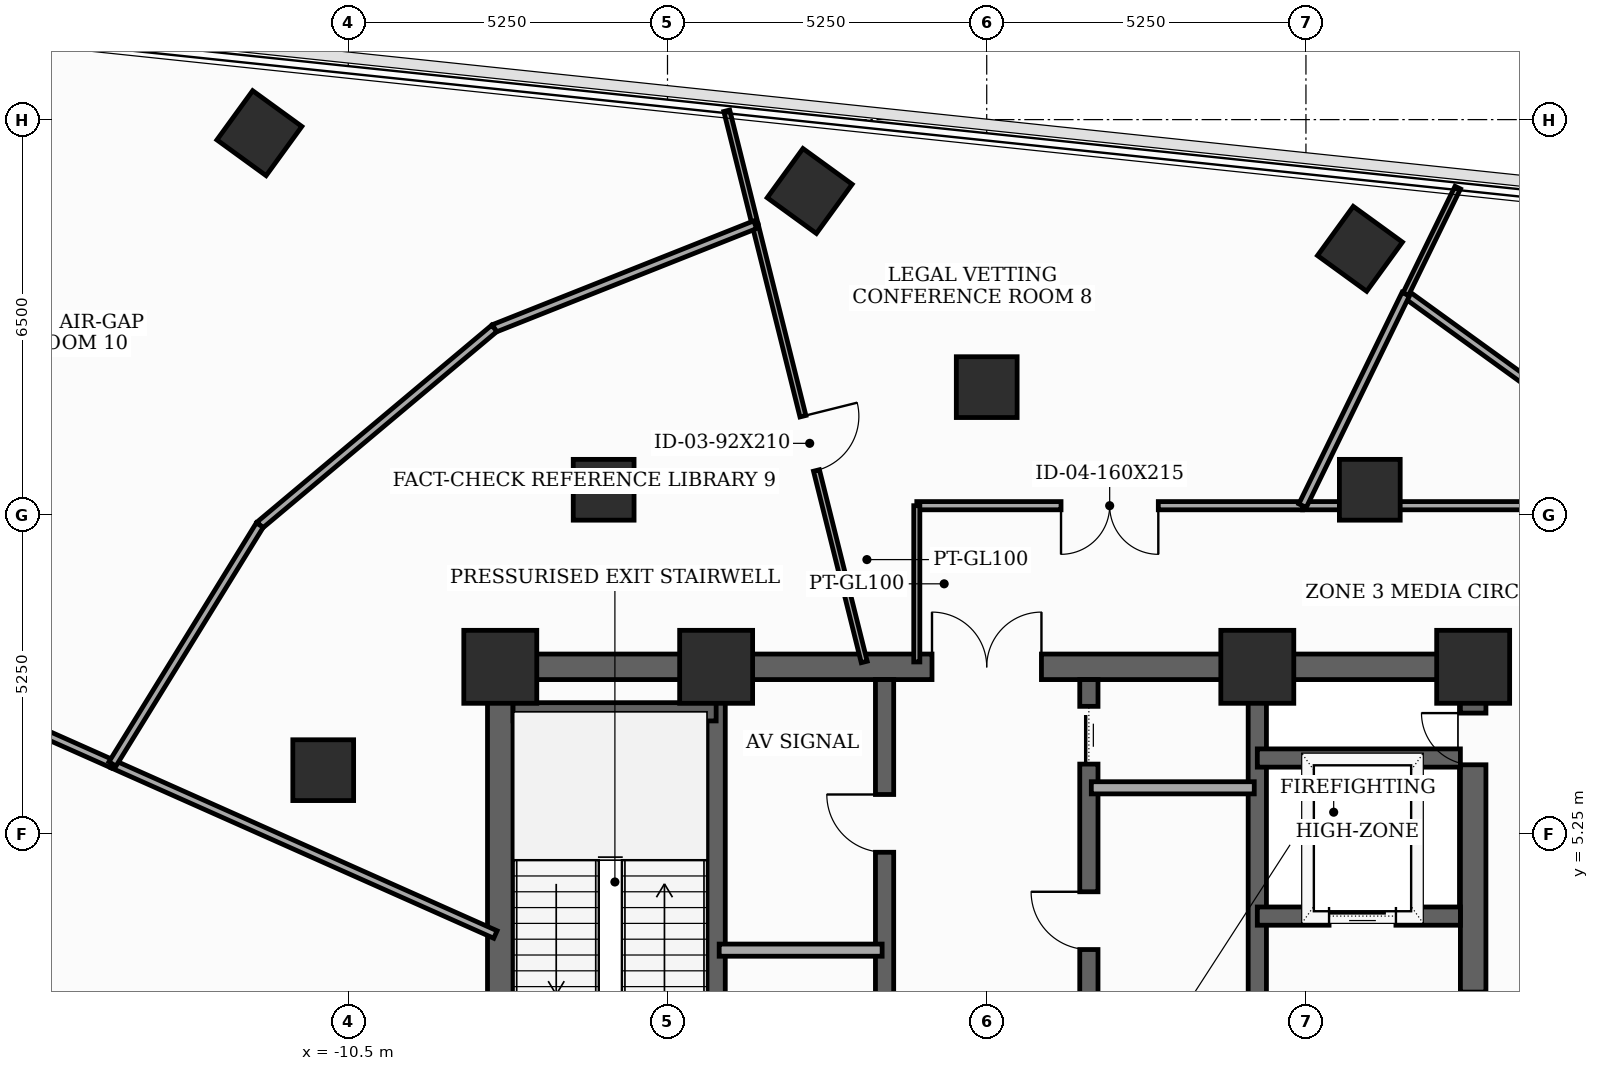
"""IFC4 building model, lengths in metres.
Left out: names, types, materials, properties, quantities, classifications, styles, units other than length and angle.
Written with IfcOpenShell. Run it as: python <this file> out.ifc"""

import sys

from ifc_helpers import new_model, si_unit, direction, frame, frame_2d, origin, origin_2d, place, context, subcontext, project, spatial, rectangle, extrude, element, fill, save


model = new_model("IFC4")
c1 = context("Model", 3, precision=1e-05, world=origin(), true_north=direction((0.0, 1.0)))
c2 = subcontext(c1, "Body", "Model", "MODEL_VIEW")
j1 = project(units=[si_unit("LENGTHUNIT", "METRE"), si_unit("PLANEANGLEUNIT", "RADIAN")], contexts=[c1])
p1 = place(None, origin())
s1 = spatial("IfcSite", under=j1, at=p1, CompositionType="ELEMENT")
p2 = place(p1, origin())
s2 = spatial("IfcBuilding", under=s1, at=p2, CompositionType="ELEMENT")
p3 = place(p2, frame((0.0, 0.0, 237.4)))
s3 = spatial("IfcBuildingStorey", under=s2, at=p3, CompositionType="ELEMENT", Elevation=237.4)
for number, where, z_axis, x_axis in (
    (1, (8.0, 8.0, 0.0), (0.0, 0.0, 1.0), (1.0, 0.0, 0.0)),
    (2, (4.45, 8.0, 0.0), (0.0, 0.0, 1.0), (1.0, 0.0, 0.0)),
    (3, (-4.45, 8.0, 0.0), (0.0, 0.0, 1.0), (1.0, 0.0, 0.0)),
    (4, (-8.0, 8.0, 0.0), (0.0, 0.0, 1.0), (1.0, 0.0, 0.0)),
):
    element("IfcColumn", number, at=place(p3, frame(where, z_axis=z_axis, x_axis=x_axis)), inside=s3, PredefinedType="COLUMN", context=c2, shape_type="SweptSolid", body=[
        extrude(rectangle(XDim=1.2, YDim=1.2, at=origin_2d()), origin(), (0.0, 0.0, 1.0), 3.7),
    ])
for number, where, z_axis, x_axis in (
    (5, (6.3, 10.912, 0.0), (0.0, 0.0, 1.0), (1.0, 0.0, 0.0)),
    (6, (0.0, 12.6, 0.0), (0.0, 0.0, 1.0), (1.0, 0.0, 0.0)),
    (7, (-6.3, 10.912, 0.0), (0.0, 0.0, 1.0), (1.0, 0.0, 0.0)),
    (8, (-10.912, 6.3, 0.0), (0.0, 0.0, 1.0), (1.0, 0.0, 0.0)),
    (9, (6.138, 14.875, 0.0), (0.0, 0.0, 1.0), (0.588, 0.809, 0.0)),
    (10, (-2.912, 15.826, 0.0), (0.0, 0.0, 1.0), (0.588, 0.809, 0.0)),
    (11, (-11.962, 16.777, 0.0), (0.0, 0.0, 1.0), (0.588, 0.809, 0.0)),
):
    element("IfcColumn", number, at=place(p3, frame(where, z_axis=z_axis, x_axis=x_axis)), inside=s3, PredefinedType="COLUMN", context=c2, shape_type="SweptSolid", body=[
        extrude(rectangle(XDim=1.0, YDim=1.0, at=origin_2d()), origin(), (0.0, 0.0, 1.0), 3.7),
    ])
p4 = place(p3, frame((-8.0, -8.0, 0.0), z_axis=(0.0, 0.0, 1.0), x_axis=(0.0, 1.0, 0.0)))
e12 = element("IfcWall", 12, at=p4, inside=s3, PredefinedType="SHEAR", context=c2, shape_type="SweptSolid", body=[
    extrude(rectangle(XDim=16.0, YDim=0.42, at=frame_2d((8.0, 0.0))), origin(), (0.0, 0.0, 1.0), 3.5),
])
p5 = place(p4, frame((0.761, 0.0, 0.0)))
e13 = element("IfcOpeningElement", 13, at=p5, cuts=e12, PredefinedType="OPENING", context=c2, shape_type="SweptSolid", body=[
    extrude(rectangle(XDim=0.85, YDim=2.02, at=frame_2d((0.425, 1.01))), frame((0.0, 0.22, 0.0), z_axis=(0.0, -1.0, 0.0), x_axis=(1.0, 0.0, 0.0)), (0.0, 0.0, 1.0), 0.44),
])
p6 = place(p4, frame((5.35, 0.0, 0.0)))
e14 = element("IfcOpeningElement", 14, at=p6, cuts=e12, PredefinedType="OPENING", context=c2, shape_type="SweptSolid", body=[
    extrude(rectangle(XDim=1.05, YDim=2.15, at=frame_2d((0.525, 1.075))), frame((0.0, 0.22, 0.0), z_axis=(0.0, -1.0, 0.0), x_axis=(1.0, 0.0, 0.0)), (0.0, 0.0, 1.0), 0.44),
])
p7 = place(p3, frame((8.0, -8.0, 0.0), z_axis=(0.0, 0.0, 1.0), x_axis=(0.0, 1.0, 0.0)))
e15 = element("IfcWall", 15, at=p7, inside=s3, PredefinedType="SHEAR", context=c2, shape_type="SweptSolid", body=[
    extrude(rectangle(XDim=16.0, YDim=0.42, at=frame_2d((8.0, 0.0))), origin(), (0.0, 0.0, 1.0), 3.5),
])
p8 = place(p7, frame((9.6, 0.0, 0.0)))
e16 = element("IfcOpeningElement", 16, at=p8, cuts=e15, PredefinedType="OPENING", context=c2, shape_type="SweptSolid", body=[
    extrude(rectangle(XDim=1.05, YDim=2.15, at=frame_2d((0.525, 1.075))), frame((0.0, 0.22, 0.0), z_axis=(0.0, -1.0, 0.0), x_axis=(1.0, 0.0, 0.0)), (0.0, 0.0, 1.0), 0.44),
])
p9 = place(p7, frame((14.389, 0.0, 0.0)))
e17 = element("IfcOpeningElement", 17, at=p9, cuts=e15, PredefinedType="OPENING", context=c2, shape_type="SweptSolid", body=[
    extrude(rectangle(XDim=0.85, YDim=2.02, at=frame_2d((0.425, 1.01))), frame((0.0, 0.22, 0.0), z_axis=(0.0, -1.0, 0.0), x_axis=(1.0, 0.0, 0.0)), (0.0, 0.0, 1.0), 0.44),
])
p10 = place(p3, frame((-8.0, 8.0, 0.0), z_axis=(0.0, 0.0, 1.0), x_axis=(1.0, 0.0, 0.0)))
e18 = element("IfcWall", 18, at=p10, inside=s3, PredefinedType="SHEAR", context=c2, shape_type="SweptSolid", body=[
    extrude(rectangle(XDim=16.0, YDim=0.42, at=frame_2d((8.0, 0.0))), origin(), (0.0, 0.0, 1.0), 3.5),
])
p11 = place(p10, frame((7.1, 0.0, 0.0)))
e19 = element("IfcOpeningElement", 19, at=p11, cuts=e18, PredefinedType="OPENING", context=c2, shape_type="SweptSolid", body=[
    extrude(rectangle(XDim=1.8, YDim=2.15, at=frame_2d((0.9, 1.075))), frame((0.0, 0.22, 0.0), z_axis=(0.0, -1.0, 0.0), x_axis=(1.0, 0.0, 0.0)), (0.0, 0.0, 1.0), 0.44),
])
for number, where, z_axis, x_axis in (
    (20, (-4.45, -7.79, 0.0), (0.0, 0.0, 1.0), (0.0, 1.0, 0.0)),
    (21, (4.45, -7.79, 0.0), (0.0, 0.0, 1.0), (0.0, 1.0, 0.0)),
):
    element("IfcWall", number, at=place(p3, frame(where, z_axis=z_axis, x_axis=x_axis)), inside=s3, PredefinedType="SHEAR", context=c2, shape_type="SweptSolid", body=[
        extrude(rectangle(XDim=15.58, YDim=0.3, at=frame_2d((7.79, 0.0))), origin(), (0.0, 0.0, 1.0), 3.5),
    ])
p12 = place(p3, frame((-7.79, 7.26, 0.0), z_axis=(0.0, 0.0, 1.0), x_axis=(1.0, 0.0, 0.0)))
e22 = element("IfcWall", 22, at=p12, inside=s3, PredefinedType="SHEAR", context=c2, shape_type="SweptSolid", body=[
    extrude(rectangle(XDim=3.34, YDim=0.3, at=frame_2d((1.67, 0.0))), origin(), (0.0, 0.0, 1.0), 3.5),
])
p13 = place(p3, frame((4.45, 3.9, 0.0), z_axis=(0.0, 0.0, 1.0), x_axis=(1.0, 0.0, 0.0)))
e23 = element("IfcWall", 23, at=p13, inside=s3, PredefinedType="SHEAR", context=c2, shape_type="SweptSolid", body=[
    extrude(rectangle(XDim=3.34, YDim=0.3, at=frame_2d((1.67, 0.0))), origin(), (0.0, 0.0, 1.0), 3.5),
])
p14 = place(p13, frame((1.18, 0.0, 0.0)))
e24 = element("IfcOpeningElement", 24, at=p14, cuts=e23, PredefinedType="OPENING", context=c2, shape_type="SweptSolid", body=[
    extrude(rectangle(XDim=1.1, YDim=2.1, at=frame_2d((0.55, 1.05))), frame((0.0, 0.16, 0.0), z_axis=(0.0, -1.0, 0.0), x_axis=(1.0, 0.0, 0.0)), (0.0, 0.0, 1.0), 0.32),
])
p15 = place(p3, frame((4.45, 6.5, 0.0), z_axis=(0.0, 0.0, 1.0), x_axis=(1.0, 0.0, 0.0)))
e25 = element("IfcWall", 25, at=p15, inside=s3, PredefinedType="SHEAR", context=c2, shape_type="SweptSolid", body=[
    extrude(rectangle(XDim=3.34, YDim=0.3, at=frame_2d((1.67, 0.0))), origin(), (0.0, 0.0, 1.0), 3.5),
])
p16 = place(p3, frame((-1.68, -4.85, 0.0), z_axis=(0.0, 0.0, 1.0), x_axis=(0.0, 1.0, 0.0)))
e26 = element("IfcWall", 26, at=p16, inside=s3, PredefinedType="SHEAR", context=c2, shape_type="SweptSolid", body=[
    extrude(rectangle(XDim=12.64, YDim=0.3, at=frame_2d((6.32, 0.0))), origin(), (0.0, 0.0, 1.0), 3.5),
])
p17 = place(p16, frame((3.5, 0.0, 0.0)))
e27 = element("IfcOpeningElement", 27, at=p17, cuts=e26, PredefinedType="OPENING", context=c2, shape_type="SweptSolid", body=[
    extrude(rectangle(XDim=0.95, YDim=2.1, at=frame_2d((0.475, 1.05))), frame((0.0, 0.16, 0.0), z_axis=(0.0, -1.0, 0.0), x_axis=(1.0, 0.0, 0.0)), (0.0, 0.0, 1.0), 0.32),
])
p18 = place(p16, frame((9.8, 0.0, 0.0)))
e28 = element("IfcOpeningElement", 28, at=p18, cuts=e26, PredefinedType="OPENING", context=c2, shape_type="SweptSolid", body=[
    extrude(rectangle(XDim=0.95, YDim=2.1, at=frame_2d((0.475, 1.05))), frame((0.0, 0.16, 0.0), z_axis=(0.0, -1.0, 0.0), x_axis=(1.0, 0.0, 0.0)), (0.0, 0.0, 1.0), 0.32),
])
p19 = place(p3, frame((1.68, -4.85, 0.0), z_axis=(0.0, 0.0, 1.0), x_axis=(0.0, 1.0, 0.0)))
e29 = element("IfcWall", 29, at=p19, inside=s3, PredefinedType="SHEAR", context=c2, shape_type="SweptSolid", body=[
    extrude(rectangle(XDim=12.64, YDim=0.3, at=frame_2d((6.32, 0.0))), origin(), (0.0, 0.0, 1.0), 3.5),
])
p20 = place(p19, frame((0.55, 0.0, 0.0)))
e30 = element("IfcOpeningElement", 30, at=p20, cuts=e29, PredefinedType="OPENING", context=c2, shape_type="SweptSolid", body=[
    extrude(rectangle(XDim=1.1, YDim=2.1, at=frame_2d((0.55, 1.05))), frame((0.0, 0.16, 0.0), z_axis=(0.0, -1.0, 0.0), x_axis=(1.0, 0.0, 0.0)), (0.0, 0.0, 1.0), 0.32),
])
p21 = place(p19, frame((2.65, 0.0, 0.0)))
e31 = element("IfcOpeningElement", 31, at=p21, cuts=e29, PredefinedType="OPENING", context=c2, shape_type="SweptSolid", body=[
    extrude(rectangle(XDim=1.1, YDim=2.1, at=frame_2d((0.55, 1.05))), frame((0.0, 0.16, 0.0), z_axis=(0.0, -1.0, 0.0), x_axis=(1.0, 0.0, 0.0)), (0.0, 0.0, 1.0), 0.32),
])
p22 = place(p19, frame((4.75, 0.0, 0.0)))
e32 = element("IfcOpeningElement", 32, at=p22, cuts=e29, PredefinedType="OPENING", context=c2, shape_type="SweptSolid", body=[
    extrude(rectangle(XDim=1.1, YDim=2.1, at=frame_2d((0.55, 1.05))), frame((0.0, 0.16, 0.0), z_axis=(0.0, -1.0, 0.0), x_axis=(1.0, 0.0, 0.0)), (0.0, 0.0, 1.0), 0.32),
])
p23 = place(p19, frame((8.2, 0.0, 0.0)))
e33 = element("IfcOpeningElement", 33, at=p23, cuts=e29, PredefinedType="OPENING", context=c2, shape_type="SweptSolid", body=[
    extrude(rectangle(XDim=0.95, YDim=2.1, at=frame_2d((0.475, 1.05))), frame((0.0, 0.16, 0.0), z_axis=(0.0, -1.0, 0.0), x_axis=(1.0, 0.0, 0.0)), (0.0, 0.0, 1.0), 0.32),
])
p24 = place(p19, frame((11.25, 0.0, 0.0)))
e34 = element("IfcOpeningElement", 34, at=p24, cuts=e29, PredefinedType="OPENING", context=c2, shape_type="SweptSolid", body=[
    extrude(rectangle(XDim=0.95, YDim=2.1, at=frame_2d((0.475, 1.05))), frame((0.0, 0.16, 0.0), z_axis=(0.0, -1.0, 0.0), x_axis=(1.0, 0.0, 0.0)), (0.0, 0.0, 1.0), 0.32),
])
for number, where, z_axis, x_axis in (
    (35, (-4.4, 3.34, 0.0), (0.0, 0.0, 1.0), (1.0, 0.0, 0.0)),
    (36, (1.72, 6.01, 0.0), (0.0, 0.0, 1.0), (1.0, 0.0, 0.0)),
):
    element("IfcWall", number, at=place(p3, frame(where, z_axis=z_axis, x_axis=x_axis)), inside=s3, PredefinedType="SOLIDWALL", context=c2, shape_type="SweptSolid", body=[
        extrude(rectangle(XDim=2.68, YDim=0.2, at=frame_2d((1.34, 0.0))), origin(), (0.0, 0.0, 1.0), 3.5),
    ])
p25 = place(p3, frame((10.15, 10.65, 0.0), z_axis=(0.0, 0.0, 1.0), x_axis=(-1.0, 0.0, 0.0)))
e37 = element("IfcWall", 37, at=p25, inside=s3, PredefinedType="PARTITIONING", context=c2, shape_type="SweptSolid", body=[
    extrude(rectangle(XDim=4.956, YDim=0.135, at=frame_2d((2.478, 0.0))), origin(), (0.0, 0.0, 1.0), 2.885),
])
p26 = place(p3, frame((5.194, 10.65, 0.0), z_axis=(0.0, 0.0, 1.0), x_axis=(-1.0, 0.0, 0.0)))
e38 = element("IfcWall", 38, at=p26, inside=s3, PredefinedType="PARTITIONING", context=c2, shape_type="SweptSolid", body=[
    extrude(rectangle(XDim=6.344, YDim=0.135, at=frame_2d((3.172, 0.0))), origin(), (0.0, 0.0, 1.0), 2.885),
])
p27 = place(p26, frame((2.372, 0.0, 0.0)))
e39 = element("IfcOpeningElement", 39, at=p27, cuts=e38, PredefinedType="OPENING", context=c2, shape_type="SweptSolid", body=[
    extrude(rectangle(XDim=1.6, YDim=2.15, at=frame_2d((0.8, 1.075))), frame((0.0, 0.077, 0.0), z_axis=(0.0, -1.0, 0.0), x_axis=(1.0, 0.0, 0.0)), (0.0, 0.0, 1.0), 0.155),
])
p28 = place(p3, frame((-1.15, 10.65, 0.0), z_axis=(0.0, 0.0, 1.0), x_axis=(0.0, -1.0, 0.0)))
e40 = element("IfcWall", 40, at=p28, inside=s3, PredefinedType="MOVABLE", context=c2, shape_type="SweptSolid", body=[
    extrude(rectangle(XDim=2.57, YDim=0.1, at=frame_2d((1.285, 0.0))), origin(), (0.0, 0.0, 1.0), 2.885),
])
p29 = place(p3, frame((-8.08, 3.597, 0.0), z_axis=(0.0, 0.0, 1.0), x_axis=(-0.913494385598, 0.40685133339, 0.0)))
e41 = element("IfcWall", 41, at=p29, inside=s3, PredefinedType="PARTITIONING", context=c2, shape_type="SweptSolid", body=[
    extrude(rectangle(XDim=6.894, YDim=0.135, at=frame_2d((3.447, 0.0))), origin(), (0.0, 0.0, 1.0), 2.885),
])
p30 = place(p3, frame((-14.378, 6.402, 0.0), z_axis=(0.0, 0.0, 1.0), x_axis=(-0.913562917951, 0.406697424315, 0.0)))
e42 = element("IfcWall", 42, at=p30, inside=s3, PredefinedType="PARTITIONING", context=c2, shape_type="SweptSolid", body=[
    extrude(rectangle(XDim=9.077, YDim=0.135, at=frame_2d((4.538, 0.0))), origin(), (0.0, 0.0, 1.0), 2.985),
])
p31 = place(p30, frame((4.078, 0.0, 0.0)))
e43 = element("IfcOpeningElement", 43, at=p31, cuts=e42, PredefinedType="OPENING", context=c2, shape_type="SweptSolid", body=[
    extrude(rectangle(XDim=0.92, YDim=2.1, at=frame_2d((0.46, 1.05))), frame((0.0, 0.077, 0.0), z_axis=(0.0, -1.0, 0.0), x_axis=(1.0, 0.0, 0.0)), (0.0, 0.0, 1.0), 0.155),
])
p32 = place(p3, frame((11.602, 10.725, 0.0), z_axis=(0.0, 0.0, 1.0), x_axis=(-0.810322435649, 0.58598425771, 0.0)))
e44 = element("IfcWall", 44, at=p32, inside=s3, PredefinedType="PARTITIONING", context=c2, shape_type="SweptSolid", body=[
    extrude(rectangle(XDim=5.812, YDim=0.135, at=frame_2d((2.906, 0.0))), origin(), (0.0, 0.0, 1.0), 3.5),
])
p33 = place(p3, frame((6.892, 14.131, 0.0), z_axis=(0.0, 0.0, 1.0), x_axis=(-0.438392584888, -0.898783589923, 0.0)))
e45 = element("IfcWall", 45, at=p33, inside=s3, PredefinedType="PARTITIONING", context=c2, shape_type="SweptSolid", body=[
    extrude(rectangle(XDim=3.873, YDim=0.135, at=frame_2d((1.937, 0.0))), origin(), (0.0, 0.0, 1.0), 2.885),
])
p34 = place(p3, frame((7.747, 15.882, 0.0), z_axis=(0.0, 0.0, 1.0), x_axis=(-0.438571753549, -0.898696176129, 0.0)))
e46 = element("IfcWall", 46, at=p34, inside=s3, PredefinedType="MOVABLE", context=c2, shape_type="SweptSolid", body=[
    extrude(rectangle(XDim=1.948, YDim=0.1, at=frame_2d((0.974, 0.0))), origin(), (0.0, 0.0, 1.0), 3.035),
])
p35 = place(p3, frame((-3.808, 15.271, 0.0), z_axis=(0.0, 0.0, 1.0), x_axis=(0.241993010569, -0.970277992555, 0.0)))
e47 = element("IfcWall", 47, at=p35, inside=s3, PredefinedType="MOVABLE", context=c2, shape_type="SweptSolid", body=[
    extrude(rectangle(XDim=7.411, YDim=0.1, at=frame_2d((3.706, 0.0))), origin(), (0.0, 0.0, 1.0), 2.885),
])
p36 = place(p35, frame((3.246, 0.0, 0.0)))
e48 = element("IfcOpeningElement", 48, at=p36, cuts=e47, PredefinedType="OPENING", context=c2, shape_type="SweptSolid", body=[
    extrude(rectangle(XDim=0.92, YDim=2.1, at=frame_2d((0.46, 1.05))), frame((0.0, 0.06, 0.0), z_axis=(0.0, -1.0, 0.0), x_axis=(1.0, 0.0, 0.0)), (0.0, 0.0, 1.0), 0.12),
])
p37 = place(p3, frame((-4.275, 17.146, 0.0), z_axis=(0.0, 0.0, 1.0), x_axis=(0.241881394388, -0.970305823464, 0.0)))
e49 = element("IfcWall", 49, at=p37, inside=s3, PredefinedType="MOVABLE", context=c2, shape_type="SweptSolid", body=[
    extrude(rectangle(XDim=1.932, YDim=0.1, at=frame_2d((0.966, 0.0))), origin(), (0.0, 0.0, 1.0), 3.035),
])
p38 = place(p3, frame((-3.808, 15.271, 0.0), z_axis=(0.0, 0.0, 1.0), x_axis=(-0.929356809345, -0.369182774414, 0.0)))
e50 = element("IfcWall", 50, at=p38, inside=s3, PredefinedType="PARTITIONING", context=c2, shape_type="SweptSolid", body=[
    extrude(rectangle(XDim=4.616, YDim=0.135, at=frame_2d((2.308, 0.0))), origin(), (0.0, 0.0, 1.0), 3.5),
])
p39 = place(p3, frame((-8.098, 13.567, 0.0), z_axis=(0.0, 0.0, 1.0), x_axis=(-0.766114520239, -0.642704085781, 0.0)))
e51 = element("IfcWall", 51, at=p39, inside=s3, PredefinedType="PARTITIONING", context=c2, shape_type="SweptSolid", body=[
    extrude(rectangle(XDim=5.035, YDim=0.135, at=frame_2d((2.517, 0.0))), origin(), (0.0, 0.0, 1.0), 2.985),
])
p40 = place(p3, frame((-11.955, 10.331, 0.0), z_axis=(0.0, 0.0, 1.0), x_axis=(-0.524888064347, -0.851171263557, 0.0)))
e52 = element("IfcWall", 52, at=p40, inside=s3, PredefinedType="PARTITIONING", context=c2, shape_type="SweptSolid", body=[
    extrude(rectangle(XDim=4.616, YDim=0.135, at=frame_2d((2.308, 0.0))), origin(), (0.0, 0.0, 1.0), 2.985),
])
p41 = place(p9, origin())
e53 = element("IfcDoor", 53, at=p41, inside=s3, OperationType="SINGLE_SWING_RIGHT", PredefinedType="TRAPDOOR", context=c2, shape_type="SweptSolid", body=[
    extrude(rectangle(XDim=0.85, YDim=2.02, at=frame_2d((0.425, 1.01))), frame((0.0, 0.025, 0.0), z_axis=(0.0, -1.0, 0.0), x_axis=(1.0, 0.0, 0.0)), (0.0, 0.0, 1.0), 0.05),
])
fill(e17, e53)
p42 = place(p11, origin())
e54 = element("IfcDoor", 54, at=p42, inside=s3, OperationType="DOUBLE_DOOR_SINGLE_SWING", PredefinedType="DOOR", context=c2, shape_type="SweptSolid", body=[
    extrude(rectangle(XDim=1.8, YDim=2.15, at=frame_2d((0.9, 1.075))), frame((0.0, 0.025, 0.0), z_axis=(0.0, -1.0, 0.0), x_axis=(1.0, 0.0, 0.0)), (0.0, 0.0, 1.0), 0.05),
])
fill(e19, e54)
p43 = place(p14, origin())
e55 = element("IfcDoor", 55, at=p43, inside=s3, OperationType="SLIDING_TO_LEFT", PredefinedType="DOOR", context=c2, shape_type="SweptSolid", body=[
    extrude(rectangle(XDim=1.1, YDim=2.1, at=frame_2d((0.55, 1.05))), frame((0.0, 0.025, 0.0), z_axis=(0.0, -1.0, 0.0), x_axis=(1.0, 0.0, 0.0)), (0.0, 0.0, 1.0), 0.05),
])
fill(e24, e55)
p44 = place(p18, origin())
e56 = element("IfcDoor", 56, at=p44, inside=s3, OperationType="SINGLE_SWING_RIGHT", PredefinedType="DOOR", context=c2, shape_type="SweptSolid", body=[
    extrude(rectangle(XDim=0.95, YDim=2.1, at=frame_2d((0.475, 1.05))), frame((0.0, 0.025, 0.0), z_axis=(0.0, -1.0, 0.0), x_axis=(1.0, 0.0, 0.0)), (0.0, 0.0, 1.0), 0.05),
])
fill(e28, e56)
p45 = place(p23, origin())
e57 = element("IfcDoor", 57, at=p45, inside=s3, OperationType="SINGLE_SWING_RIGHT", PredefinedType="DOOR", context=c2, shape_type="SweptSolid", body=[
    extrude(rectangle(XDim=0.95, YDim=2.1, at=frame_2d((0.475, 1.05))), frame((0.0, 0.025, 0.0), z_axis=(0.0, -1.0, 0.0), x_axis=(1.0, 0.0, 0.0)), (0.0, 0.0, 1.0), 0.05),
])
fill(e33, e57)
p46 = place(p24, origin())
e58 = element("IfcDoor", 58, at=p46, inside=s3, OperationType="SLIDING_TO_LEFT", PredefinedType="DOOR", context=c2, shape_type="SweptSolid", body=[
    extrude(rectangle(XDim=0.95, YDim=2.1, at=frame_2d((0.475, 1.05))), frame((0.0, 0.025, 0.0), z_axis=(0.0, -1.0, 0.0), x_axis=(1.0, 0.0, 0.0)), (0.0, 0.0, 1.0), 0.05),
])
fill(e34, e58)
p47 = place(p27, origin())
e59 = element("IfcDoor", 59, at=p47, inside=s3, OperationType="DOUBLE_DOOR_SINGLE_SWING", PredefinedType="DOOR", context=c2, shape_type="SweptSolid", body=[
    extrude(rectangle(XDim=1.6, YDim=2.15, at=frame_2d((0.8, 1.075))), frame((0.0, 0.025, 0.0), z_axis=(0.0, -1.0, 0.0), x_axis=(1.0, 0.0, 0.0)), (0.0, 0.0, 1.0), 0.05),
])
fill(e39, e59)
p48 = place(p36, origin())
e60 = element("IfcDoor", 60, at=p48, inside=s3, OperationType="SINGLE_SWING_LEFT", PredefinedType="DOOR", context=c2, shape_type="SweptSolid", body=[
    extrude(rectangle(XDim=0.92, YDim=2.1, at=frame_2d((0.46, 1.05))), frame((0.0, 0.025, 0.0), z_axis=(0.0, -1.0, 0.0), x_axis=(1.0, 0.0, 0.0)), (0.0, 0.0, 1.0), 0.05),
])
fill(e48, e60)
save(model, sys.argv[1])
